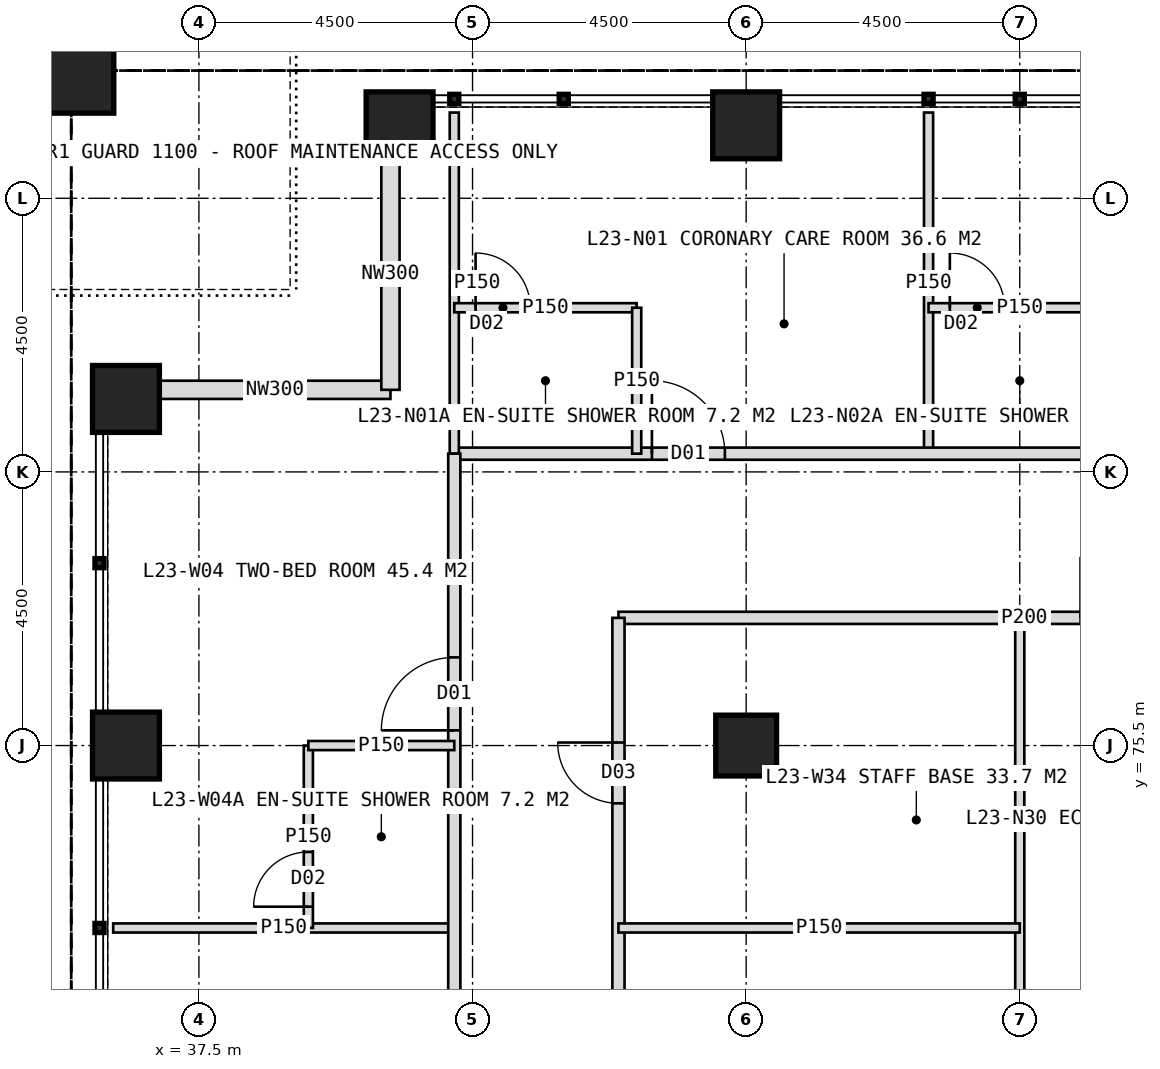
"""IFC4 building model, lengths in metres.
Left out: names, types, materials, properties, quantities, classifications, styles, units other than length and angle.
Written with IfcOpenShell. Run it as: python <this file> out.ifc"""

import sys

from ifc_helpers import new_model, si_unit, direction, frame, frame_2d, origin, origin_2d, place, context, subcontext, project, spatial, rectangle, hollow_rectangle, extrude, element, fill, save


model = new_model("IFC4")
c1 = context("Model", 3, precision=1e-05, world=origin(), true_north=direction((0.0, 1.0)))
c2 = subcontext(c1, "Body", "Model", "MODEL_VIEW")
j1 = project(units=[si_unit("LENGTHUNIT", "METRE"), si_unit("PLANEANGLEUNIT", "RADIAN")], contexts=[c1])
p1 = place(None, origin())
s1 = spatial("IfcSite", under=j1, at=p1, CompositionType="ELEMENT")
p2 = place(p1, origin())
s2 = spatial("IfcBuilding", under=s1, at=p2, CompositionType="ELEMENT")
p3 = place(p2, frame((0.0, 0.0, 100.0)))
s3 = spatial("IfcBuildingStorey", under=s2, at=p3, CompositionType="ELEMENT", Elevation=100.0)
p4 = place(p3, frame((46.5, 75.5, 0.0), z_axis=(0.0, 0.0, 1.0), x_axis=(1.0, 0.0, 0.0)))
e1 = element("IfcColumn", 1, at=p4, inside=s3, PredefinedType="COLUMN", context=c2, shape_type="SweptSolid", body=[
    extrude(hollow_rectangle(XDim=1.0, YDim=1.0, WallThickness=0.1, at=origin_2d()), origin(), (0.0, 0.0, 1.0), 4.0),
])
for number, where, z_axis, x_axis in (
    (2, (40.8, 85.7, 0.0), (0.0, 0.0, 1.0), (1.0, 0.0, 0.0)),
    (3, (46.5, 85.7, 0.0), (0.0, 0.0, 1.0), (1.0, 0.0, 0.0)),
    (4, (36.3, 75.5, 0.0), (0.0, 0.0, 1.0), (1.0, 0.0, 0.0)),
    (5, (36.3, 81.2, 0.0), (0.0, 0.0, 1.0), (1.0, 0.0, 0.0)),
):
    element("IfcColumn", number, at=place(p3, frame(where, z_axis=z_axis, x_axis=x_axis)), inside=s3, PredefinedType="COLUMN", context=c2, shape_type="SweptSolid", body=[
        extrude(hollow_rectangle(XDim=1.1, YDim=1.1, WallThickness=0.1, at=origin_2d()), origin(), (0.0, 0.0, 1.0), 4.0),
    ])
p5 = place(p3, frame((35.4, 86.6, 2.0), z_axis=(0.0, 0.0, 1.0), x_axis=(1.0, 0.0, 0.0)))
e6 = element("IfcColumn", 6, at=p5, inside=s3, PredefinedType="COLUMN", context=c2, shape_type="SweptSolid", body=[
    extrude(hollow_rectangle(XDim=1.4, YDim=1.4, WallThickness=0.08, at=origin_2d()), origin(), (0.0, 0.0, 1.0), 2.0),
])
for number, where, z_axis, x_axis in (
    (7, (36.85, 81.35, 0.0), (0.0, 0.0, 1.0), (1.0, 0.0, 0.0)),
    (8, (40.65, 81.35, 0.0), (0.0, 0.0, 1.0), (0.0, 1.0, 0.0)),
):
    element("IfcWall", number, at=place(p3, frame(where, z_axis=z_axis, x_axis=x_axis)), inside=s3, PredefinedType="ELEMENTEDWALL", context=c2, shape_type="SweptSolid", body=[
        extrude(rectangle(XDim=3.8, YDim=0.3, at=frame_2d((1.9, 0.0))), origin(), (0.0, 0.0, 1.0), 4.0),
    ])
p6 = place(p3, frame((49.5, 80.3, 0.0), z_axis=(0.0, 0.0, 1.0), x_axis=(0.0, 1.0, 0.0)))
e9 = element("IfcWall", 9, at=p6, inside=s3, PredefinedType="PARTITIONING", context=c2, shape_type="SweptSolid", body=[
    extrude(rectangle(XDim=5.61, YDim=0.15, at=frame_2d((2.805, 0.0))), origin(), (0.0, 0.0, 1.0), 3.75),
])
p7 = place(p3, frame((41.7, 80.3, 0.0), z_axis=(0.0, 0.0, 1.0), x_axis=(1.0, 0.0, 0.0)))
e10 = element("IfcWall", 10, at=p7, inside=s3, PredefinedType="PARTITIONING", context=c2, shape_type="SweptSolid", body=[
    extrude(rectangle(XDim=36.6, YDim=0.2, at=frame_2d((18.3, 0.0))), origin(), (0.0, 0.0, 1.0), 3.75),
])
p8 = place(p7, frame((3.25, 0.0, 0.0)))
e11 = element("IfcOpeningElement", 11, at=p8, cuts=e10, PredefinedType="OPENING", context=c2, shape_type="SweptSolid", body=[
    extrude(rectangle(XDim=1.2, YDim=2.2, at=frame_2d((0.6, 1.1))), frame((0.0, 0.11, 0.0), z_axis=(0.0, -1.0, 0.0), x_axis=(1.0, 0.0, 0.0)), (0.0, 0.0, 1.0), 0.22),
])
p9 = place(p7, frame((11.05, 0.0, 0.0)))
e12 = element("IfcOpeningElement", 12, at=p9, cuts=e10, PredefinedType="OPENING", context=c2, shape_type="SweptSolid", body=[
    extrude(rectangle(XDim=1.2, YDim=2.2, at=frame_2d((0.6, 1.1))), frame((0.0, 0.11, 0.0), z_axis=(0.0, -1.0, 0.0), x_axis=(1.0, 0.0, 0.0)), (0.0, 0.0, 1.0), 0.22),
])
p10 = place(p7, frame((20.05, 0.0, 0.0)))
e13 = element("IfcOpeningElement", 13, at=p10, cuts=e10, PredefinedType="OPENING", context=c2, shape_type="SweptSolid", body=[
    extrude(rectangle(XDim=1.2, YDim=2.2, at=frame_2d((0.6, 1.1))), frame((0.0, 0.11, 0.0), z_axis=(0.0, -1.0, 0.0), x_axis=(1.0, 0.0, 0.0)), (0.0, 0.0, 1.0), 0.22),
])
p11 = place(p7, frame((29.05, 0.0, 0.0)))
e14 = element("IfcOpeningElement", 14, at=p11, cuts=e10, PredefinedType="OPENING", context=c2, shape_type="SweptSolid", body=[
    extrude(rectangle(XDim=1.2, YDim=2.2, at=frame_2d((0.6, 1.1))), frame((0.0, 0.11, 0.0), z_axis=(0.0, -1.0, 0.0), x_axis=(1.0, 0.0, 0.0)), (0.0, 0.0, 1.0), 0.22),
])
p12 = place(p7, frame((34.95, 0.0, 0.0)))
e15 = element("IfcOpeningElement", 15, at=p12, cuts=e10, PredefinedType="OPENING", context=c2, shape_type="SweptSolid", body=[
    extrude(rectangle(XDim=1.0, YDim=2.1, at=frame_2d((0.5, 1.05))), frame((0.0, 0.11, 0.0), z_axis=(0.0, -1.0, 0.0), x_axis=(1.0, 0.0, 0.0)), (0.0, 0.0, 1.0), 0.22),
])
p13 = place(p3, frame((41.7, 80.3, 0.0), z_axis=(0.0, 0.0, 1.0), x_axis=(0.0, 1.0, 0.0)))
e16 = element("IfcWall", 16, at=p13, inside=s3, PredefinedType="PARTITIONING", context=c2, shape_type="SweptSolid", body=[
    extrude(rectangle(XDim=5.61, YDim=0.15, at=frame_2d((2.805, 0.0))), origin(), (0.0, 0.0, 1.0), 3.75),
])
p14 = place(p3, frame((41.7, 82.7, 0.0), z_axis=(0.0, 0.0, 1.0), x_axis=(1.0, 0.0, 0.0)))
e17 = element("IfcWall", 17, at=p14, inside=s3, PredefinedType="PARTITIONING", context=c2, shape_type="SweptSolid", body=[
    extrude(rectangle(XDim=3.0, YDim=0.15, at=frame_2d((1.5, 0.0))), origin(), (0.0, 0.0, 1.0), 3.75),
])
p15 = place(p14, frame((0.35, 0.0, 0.0)))
e18 = element("IfcOpeningElement", 18, at=p15, cuts=e17, PredefinedType="OPENING", context=c2, shape_type="SweptSolid", body=[
    extrude(rectangle(XDim=0.9, YDim=2.1, at=frame_2d((0.45, 1.05))), frame((0.0, 0.085, 0.0), z_axis=(0.0, -1.0, 0.0), x_axis=(1.0, 0.0, 0.0)), (0.0, 0.0, 1.0), 0.17),
])
p16 = place(p3, frame((44.7, 80.3, 0.0), z_axis=(0.0, 0.0, 1.0), x_axis=(0.0, 1.0, 0.0)))
e19 = element("IfcWall", 19, at=p16, inside=s3, PredefinedType="PARTITIONING", context=c2, shape_type="SweptSolid", body=[
    extrude(rectangle(XDim=2.4, YDim=0.15, at=frame_2d((1.2, 0.0))), origin(), (0.0, 0.0, 1.0), 3.75),
])
p17 = place(p3, frame((49.5, 82.7, 0.0), z_axis=(0.0, 0.0, 1.0), x_axis=(1.0, 0.0, 0.0)))
e20 = element("IfcWall", 20, at=p17, inside=s3, PredefinedType="PARTITIONING", context=c2, shape_type="SweptSolid", body=[
    extrude(rectangle(XDim=3.0, YDim=0.15, at=frame_2d((1.5, 0.0))), origin(), (0.0, 0.0, 1.0), 3.75),
])
p18 = place(p17, frame((0.35, 0.0, 0.0)))
e21 = element("IfcOpeningElement", 21, at=p18, cuts=e20, PredefinedType="OPENING", context=c2, shape_type="SweptSolid", body=[
    extrude(rectangle(XDim=0.9, YDim=2.1, at=frame_2d((0.45, 1.05))), frame((0.0, 0.085, 0.0), z_axis=(0.0, -1.0, 0.0), x_axis=(1.0, 0.0, 0.0)), (0.0, 0.0, 1.0), 0.17),
])
p19 = place(p3, frame((51.0, 71.0, 0.0), z_axis=(0.0, 0.0, 1.0), x_axis=(0.0, 1.0, 0.0)))
e22 = element("IfcWall", 22, at=p19, inside=s3, PredefinedType="PARTITIONING", context=c2, shape_type="SweptSolid", body=[
    extrude(rectangle(XDim=6.6, YDim=0.15, at=frame_2d((3.3, 0.0))), origin(), (0.0, 0.0, 1.0), 3.75),
])
p20 = place(p3, frame((44.4, 77.6, 0.0), z_axis=(0.0, 0.0, 1.0), x_axis=(1.0, 0.0, 0.0)))
e23 = element("IfcWall", 23, at=p20, inside=s3, PredefinedType="PARTITIONING", context=c2, shape_type="SweptSolid", body=[
    extrude(rectangle(XDim=13.35, YDim=0.2, at=frame_2d((6.675, 0.0))), origin(), (0.0, 0.0, 1.0), 3.75),
])
p21 = place(p20, frame((7.6, 0.0, 0.0)))
e24 = element("IfcOpeningElement", 24, at=p21, cuts=e23, PredefinedType="OPENING", context=c2, shape_type="SweptSolid", body=[
    extrude(rectangle(XDim=1.0, YDim=2.1, at=frame_2d((0.5, 1.05))), frame((0.0, 0.11, 0.0), z_axis=(0.0, -1.0, 0.0), x_axis=(1.0, 0.0, 0.0)), (0.0, 0.0, 1.0), 0.22),
])
p22 = place(p20, frame((10.975, 0.0, 0.0)))
e25 = element("IfcOpeningElement", 25, at=p22, cuts=e23, PredefinedType="OPENING", context=c2, shape_type="SweptSolid", body=[
    extrude(rectangle(XDim=1.0, YDim=2.1, at=frame_2d((0.5, 1.05))), frame((0.0, 0.11, 0.0), z_axis=(0.0, -1.0, 0.0), x_axis=(1.0, 0.0, 0.0)), (0.0, 0.0, 1.0), 0.22),
])
p23 = place(p3, frame((41.7, 72.5, 0.0), z_axis=(0.0, 0.0, 1.0), x_axis=(-1.0, 0.0, 0.0)))
e26 = element("IfcWall", 26, at=p23, inside=s3, PredefinedType="PARTITIONING", context=c2, shape_type="SweptSolid", body=[
    extrude(rectangle(XDim=5.61, YDim=0.15, at=frame_2d((2.805, 0.0))), origin(), (0.0, 0.0, 1.0), 3.75),
])
p24 = place(p3, frame((41.7, 43.7, 0.0), z_axis=(0.0, 0.0, 1.0), x_axis=(0.0, 1.0, 0.0)))
e27 = element("IfcWall", 27, at=p24, inside=s3, PredefinedType="PARTITIONING", context=c2, shape_type="SweptSolid", body=[
    extrude(rectangle(XDim=36.6, YDim=0.2, at=frame_2d((18.3, 0.0))), origin(), (0.0, 0.0, 1.0), 3.75),
])
p25 = place(p24, frame((3.25, 0.0, 0.0)))
e28 = element("IfcOpeningElement", 28, at=p25, cuts=e27, PredefinedType="OPENING", context=c2, shape_type="SweptSolid", body=[
    extrude(rectangle(XDim=1.2, YDim=2.2, at=frame_2d((0.6, 1.1))), frame((0.0, 0.11, 0.0), z_axis=(0.0, -1.0, 0.0), x_axis=(1.0, 0.0, 0.0)), (0.0, 0.0, 1.0), 0.22),
])
p26 = place(p24, frame((11.05, 0.0, 0.0)))
e29 = element("IfcOpeningElement", 29, at=p26, cuts=e27, PredefinedType="OPENING", context=c2, shape_type="SweptSolid", body=[
    extrude(rectangle(XDim=1.2, YDim=2.2, at=frame_2d((0.6, 1.1))), frame((0.0, 0.11, 0.0), z_axis=(0.0, -1.0, 0.0), x_axis=(1.0, 0.0, 0.0)), (0.0, 0.0, 1.0), 0.22),
])
p27 = place(p24, frame((21.55, 0.0, 0.0)))
e30 = element("IfcOpeningElement", 30, at=p27, cuts=e27, PredefinedType="OPENING", context=c2, shape_type="SweptSolid", body=[
    extrude(rectangle(XDim=1.2, YDim=2.2, at=frame_2d((0.6, 1.1))), frame((0.0, 0.11, 0.0), z_axis=(0.0, -1.0, 0.0), x_axis=(1.0, 0.0, 0.0)), (0.0, 0.0, 1.0), 0.22),
])
p28 = place(p24, frame((32.05, 0.0, 0.0)))
e31 = element("IfcOpeningElement", 31, at=p28, cuts=e27, PredefinedType="OPENING", context=c2, shape_type="SweptSolid", body=[
    extrude(rectangle(XDim=1.2, YDim=2.2, at=frame_2d((0.6, 1.1))), frame((0.0, 0.11, 0.0), z_axis=(0.0, -1.0, 0.0), x_axis=(1.0, 0.0, 0.0)), (0.0, 0.0, 1.0), 0.22),
])
p29 = place(p3, frame((39.3, 72.5, 0.0), z_axis=(0.0, 0.0, 1.0), x_axis=(0.0, 1.0, 0.0)))
e32 = element("IfcWall", 32, at=p29, inside=s3, PredefinedType="PARTITIONING", context=c2, shape_type="SweptSolid", body=[
    extrude(rectangle(XDim=3.0, YDim=0.15, at=frame_2d((1.5, 0.0))), origin(), (0.0, 0.0, 1.0), 3.75),
])
p30 = place(p29, frame((0.35, 0.0, 0.0)))
e33 = element("IfcOpeningElement", 33, at=p30, cuts=e32, PredefinedType="OPENING", context=c2, shape_type="SweptSolid", body=[
    extrude(rectangle(XDim=0.9, YDim=2.1, at=frame_2d((0.45, 1.05))), frame((0.0, 0.085, 0.0), z_axis=(0.0, -1.0, 0.0), x_axis=(1.0, 0.0, 0.0)), (0.0, 0.0, 1.0), 0.17),
])
p31 = place(p3, frame((41.7, 75.5, 0.0), z_axis=(0.0, 0.0, 1.0), x_axis=(-1.0, 0.0, 0.0)))
e34 = element("IfcWall", 34, at=p31, inside=s3, PredefinedType="PARTITIONING", context=c2, shape_type="SweptSolid", body=[
    extrude(rectangle(XDim=2.4, YDim=0.15, at=frame_2d((1.2, 0.0))), origin(), (0.0, 0.0, 1.0), 2.95),
])
p32 = place(p3, frame((44.4, 62.0, 0.0), z_axis=(0.0, 0.0, 1.0), x_axis=(0.0, 1.0, 0.0)))
e35 = element("IfcWall", 35, at=p32, inside=s3, PredefinedType="PARTITIONING", context=c2, shape_type="SweptSolid", body=[
    extrude(rectangle(XDim=15.6, YDim=0.2, at=frame_2d((7.8, 0.0))), origin(), (0.0, 0.0, 1.0), 3.75),
])
p33 = place(p32, frame((2.5, 0.0, 0.0)))
e36 = element("IfcOpeningElement", 36, at=p33, cuts=e35, PredefinedType="OPENING", context=c2, shape_type="SweptSolid", body=[
    extrude(rectangle(XDim=1.0, YDim=2.1, at=frame_2d((0.5, 1.05))), frame((0.0, 0.11, 0.0), z_axis=(0.0, -1.0, 0.0), x_axis=(1.0, 0.0, 0.0)), (0.0, 0.0, 1.0), 0.22),
])
p34 = place(p32, frame((7.75, 0.0, 0.0)))
e37 = element("IfcOpeningElement", 37, at=p34, cuts=e35, PredefinedType="OPENING", context=c2, shape_type="SweptSolid", body=[
    extrude(rectangle(XDim=1.0, YDim=2.1, at=frame_2d((0.5, 1.05))), frame((0.0, 0.11, 0.0), z_axis=(0.0, -1.0, 0.0), x_axis=(1.0, 0.0, 0.0)), (0.0, 0.0, 1.0), 0.22),
])
p35 = place(p32, frame((12.55, 0.0, 0.0)))
e38 = element("IfcOpeningElement", 38, at=p35, cuts=e35, PredefinedType="OPENING", context=c2, shape_type="SweptSolid", body=[
    extrude(rectangle(XDim=1.0, YDim=2.1, at=frame_2d((0.5, 1.05))), frame((0.0, 0.11, 0.0), z_axis=(0.0, -1.0, 0.0), x_axis=(1.0, 0.0, 0.0)), (0.0, 0.0, 1.0), 0.22),
])
p36 = place(p3, frame((51.0, 72.5, 0.0), z_axis=(0.0, 0.0, 1.0), x_axis=(-1.0, 0.0, 0.0)))
e39 = element("IfcWall", 39, at=p36, inside=s3, PredefinedType="PARTITIONING", context=c2, shape_type="SweptSolid", body=[
    extrude(rectangle(XDim=6.6, YDim=0.15, at=frame_2d((3.3, 0.0))), origin(), (0.0, 0.0, 1.0), 3.75),
])
p37 = place(p8, origin())
e40 = element("IfcDoor", 40, at=p37, inside=s3, OperationType="SINGLE_SWING_LEFT", PredefinedType="DOOR", context=c2, shape_type="SweptSolid", body=[
    extrude(rectangle(XDim=1.2, YDim=2.2, at=frame_2d((0.6, 1.1))), frame((0.0, 0.025, 0.0), z_axis=(0.0, -1.0, 0.0), x_axis=(1.0, 0.0, 0.0)), (0.0, 0.0, 1.0), 0.05),
])
fill(e11, e40)
p38 = place(p15, origin())
e41 = element("IfcDoor", 41, at=p38, inside=s3, OperationType="SINGLE_SWING_LEFT", PredefinedType="DOOR", context=c2, shape_type="SweptSolid", body=[
    extrude(rectangle(XDim=0.9, YDim=2.1, at=frame_2d((0.45, 1.05))), frame((0.0, 0.025, 0.0), z_axis=(0.0, -1.0, 0.0), x_axis=(1.0, 0.0, 0.0)), (0.0, 0.0, 1.0), 0.05),
])
fill(e18, e41)
p39 = place(p18, origin())
e42 = element("IfcDoor", 42, at=p39, inside=s3, OperationType="SINGLE_SWING_LEFT", PredefinedType="DOOR", context=c2, shape_type="SweptSolid", body=[
    extrude(rectangle(XDim=0.9, YDim=2.1, at=frame_2d((0.45, 1.05))), frame((0.0, 0.025, 0.0), z_axis=(0.0, -1.0, 0.0), x_axis=(1.0, 0.0, 0.0)), (0.0, 0.0, 1.0), 0.05),
])
fill(e21, e42)
p40 = place(p28, origin())
e43 = element("IfcDoor", 43, at=p40, inside=s3, OperationType="SINGLE_SWING_LEFT", PredefinedType="DOOR", context=c2, shape_type="SweptSolid", body=[
    extrude(rectangle(XDim=1.2, YDim=2.2, at=frame_2d((0.6, 1.1))), frame((0.0, 0.025, 0.0), z_axis=(0.0, -1.0, 0.0), x_axis=(1.0, 0.0, 0.0)), (0.0, 0.0, 1.0), 0.05),
])
fill(e31, e43)
p41 = place(p30, origin())
e44 = element("IfcDoor", 44, at=p41, inside=s3, OperationType="SINGLE_SWING_LEFT", PredefinedType="DOOR", context=c2, shape_type="SweptSolid", body=[
    extrude(rectangle(XDim=0.9, YDim=2.1, at=frame_2d((0.45, 1.05))), frame((0.0, 0.025, 0.0), z_axis=(0.0, -1.0, 0.0), x_axis=(1.0, 0.0, 0.0)), (0.0, 0.0, 1.0), 0.05),
])
fill(e33, e44)
p42 = place(p35, origin())
e45 = element("IfcDoor", 45, at=p42, inside=s3, OperationType="SINGLE_SWING_RIGHT", PredefinedType="DOOR", context=c2, shape_type="SweptSolid", body=[
    extrude(rectangle(XDim=1.0, YDim=2.1, at=frame_2d((0.5, 1.05))), frame((0.0, 0.025, 0.0), z_axis=(0.0, -1.0, 0.0), x_axis=(1.0, 0.0, 0.0)), (0.0, 0.0, 1.0), 0.05),
])
fill(e38, e45)
save(model, sys.argv[1])
